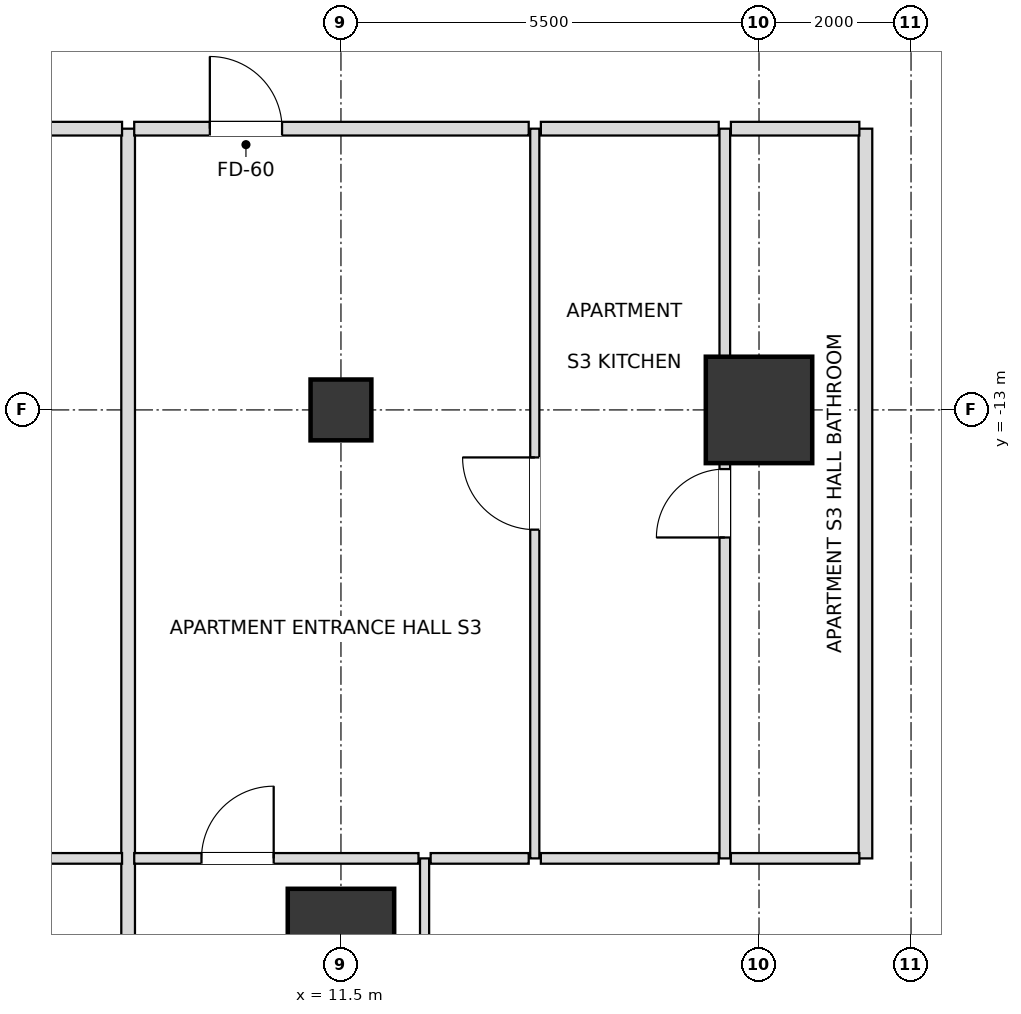
"""IFC4 building model, lengths in metres.
Left out: names, types, materials, properties, quantities, classifications, styles, units other than length and angle.
Written with IfcOpenShell. Run it as: python <this file> out.ifc"""

import sys

from ifc_helpers import new_model, si_unit, direction, frame, frame_2d, origin, origin_2d, place, context, subcontext, project, spatial, rectangle, extrude, element, fill, save


model = new_model("IFC4")
c1 = context("Model", 3, precision=1e-05, world=origin(), true_north=direction((0.0, 1.0)))
c2 = subcontext(c1, "Body", "Model", "MODEL_VIEW")
j1 = project(units=[si_unit("LENGTHUNIT", "METRE"), si_unit("PLANEANGLEUNIT", "RADIAN")], contexts=[c1])
p1 = place(None, origin())
s1 = spatial("IfcSite", under=j1, at=p1, CompositionType="ELEMENT")
p2 = place(p1, origin())
s2 = spatial("IfcBuilding", under=s1, at=p2, CompositionType="ELEMENT")
p3 = place(p2, frame((0.0, 0.0, 46.8)))
s3 = spatial("IfcBuildingStorey", under=s2, at=p3, CompositionType="ELEMENT", Elevation=46.8)
for number, where, z_axis, x_axis in (
    (1, (11.5, -20.0, 0.0), (0.0, 0.0, 1.0), (1.0, 0.0, 0.0)),
    (2, (17.0, -13.0, 0.0), (0.0, 0.0, 1.0), (1.0, 0.0, 0.0)),
):
    element("IfcColumn", number, at=place(p3, frame(where, z_axis=z_axis, x_axis=x_axis)), inside=s3, PredefinedType="USERDEFINED", context=c2, shape_type="SweptSolid", body=[
        extrude(rectangle(XDim=1.4, YDim=1.4, at=origin_2d()), origin(), (0.0, 0.0, 1.0), 3.6),
    ])
p4 = place(p3, frame((11.5, -13.0, 0.0), z_axis=(0.0, 0.0, 1.0), x_axis=(1.0, 0.0, 0.0)))
e3 = element("IfcColumn", 3, at=p4, inside=s3, PredefinedType="COLUMN", context=c2, shape_type="SweptSolid", body=[
    extrude(rectangle(XDim=0.8, YDim=0.8, at=origin_2d()), origin(), (0.0, 0.0, 1.0), 3.6),
])
p5 = place(p3, frame((8.7, -24.9, 0.0), z_axis=(0.0, 0.0, 1.0), x_axis=(0.0, 1.0, 0.0)))
e4 = element("IfcWall", 4, at=p5, inside=s3, PredefinedType="PARTITIONING", context=c2, shape_type="SweptSolid", body=[
    extrude(rectangle(XDim=15.6, YDim=0.18, at=frame_2d((7.8, 0.0))), origin(), (0.0, 0.0, 1.0), 2.816),
])
p6 = place(p3, frame((12.6, -24.9, 0.0), z_axis=(0.0, 0.0, 1.0), x_axis=(0.0, 1.0, 0.0)))
e5 = element("IfcWall", 5, at=p6, inside=s3, PredefinedType="PARTITIONING", context=c2, shape_type="SweptSolid", body=[
    extrude(rectangle(XDim=6.0, YDim=0.12, at=frame_2d((3.0, 0.0))), origin(), (0.0, 0.0, 1.0), 2.736),
])
p7 = place(p6, frame((2.55, 0.0, 0.0)))
e6 = element("IfcOpeningElement", 6, at=p7, cuts=e5, PredefinedType="OPENING", context=c2, shape_type="SweptSolid", body=[
    extrude(rectangle(XDim=0.9, YDim=2.1, at=frame_2d((0.45, 1.05))), frame((0.0, 0.07, 0.0), z_axis=(0.0, -1.0, 0.0), x_axis=(1.0, 0.0, 0.0)), (0.0, 0.0, 1.0), 0.14),
])
p8 = place(p3, frame((14.05, -18.9, 0.0), z_axis=(0.0, 0.0, 1.0), x_axis=(0.0, 1.0, 0.0)))
e7 = element("IfcWall", 7, at=p8, inside=s3, PredefinedType="PARTITIONING", context=c2, shape_type="SweptSolid", body=[
    extrude(rectangle(XDim=9.6, YDim=0.12, at=frame_2d((4.8, 0.0))), origin(), (0.0, 0.0, 1.0), 2.736),
])
p9 = place(p8, frame((4.325, 0.0, 0.0)))
e8 = element("IfcOpeningElement", 8, at=p9, cuts=e7, PredefinedType="OPENING", context=c2, shape_type="SweptSolid", body=[
    extrude(rectangle(XDim=0.95, YDim=2.1, at=frame_2d((0.475, 1.05))), frame((0.0, 0.07, 0.0), z_axis=(0.0, -1.0, 0.0), x_axis=(1.0, 0.0, 0.0)), (0.0, 0.0, 1.0), 0.14),
])
p10 = place(p3, frame((16.55, -18.9, 0.0), z_axis=(0.0, 0.0, 1.0), x_axis=(0.0, 1.0, 0.0)))
e9 = element("IfcWall", 9, at=p10, inside=s3, PredefinedType="PARTITIONING", context=c2, shape_type="SweptSolid", body=[
    extrude(rectangle(XDim=9.6, YDim=0.14, at=frame_2d((4.8, 0.0))), origin(), (0.0, 0.0, 1.0), 2.736),
])
p11 = place(p10, frame((4.222, 0.0, 0.0)))
e10 = element("IfcOpeningElement", 10, at=p11, cuts=e9, PredefinedType="OPENING", context=c2, shape_type="SweptSolid", body=[
    extrude(rectangle(XDim=0.9, YDim=2.1, at=frame_2d((0.45, 1.05))), frame((0.0, 0.08, 0.0), z_axis=(0.0, -1.0, 0.0), x_axis=(1.0, 0.0, 0.0)), (0.0, 0.0, 1.0), 0.16),
])
p12 = place(p3, frame((18.4, -18.9, 0.0), z_axis=(0.0, 0.0, 1.0), x_axis=(0.0, 1.0, 0.0)))
e11 = element("IfcWall", 11, at=p12, inside=s3, PredefinedType="PARTITIONING", context=c2, shape_type="SweptSolid", body=[
    extrude(rectangle(XDim=9.6, YDim=0.18, at=frame_2d((4.8, 0.0))), origin(), (0.0, 0.0, 1.0), 2.736),
])
p13 = place(p3, frame((5.83, -18.9, 0.0), z_axis=(0.0, 0.0, 1.0), x_axis=(1.0, 0.0, 0.0)))
e12 = element("IfcWall", 12, at=p13, inside=s3, PredefinedType="PARTITIONING", context=c2, shape_type="SweptSolid", body=[
    extrude(rectangle(XDim=2.79, YDim=0.14, at=frame_2d((1.395, 0.0))), origin(), (0.0, 0.0, 1.0), 2.816),
])
p14 = place(p3, frame((8.78, -18.9, 0.0), z_axis=(0.0, 0.0, 1.0), x_axis=(1.0, 0.0, 0.0)))
e13 = element("IfcWall", 13, at=p14, inside=s3, PredefinedType="PARTITIONING", context=c2, shape_type="SweptSolid", body=[
    extrude(rectangle(XDim=3.74, YDim=0.14, at=frame_2d((1.87, 0.0))), origin(), (0.0, 0.0, 1.0), 2.736),
])
p15 = place(p14, frame((0.885, 0.0, 0.0)))
e14 = element("IfcOpeningElement", 14, at=p15, cuts=e13, PredefinedType="OPENING", context=c2, shape_type="SweptSolid", body=[
    extrude(rectangle(XDim=0.95, YDim=2.1, at=frame_2d((0.475, 1.05))), frame((0.0, 0.08, 0.0), z_axis=(0.0, -1.0, 0.0), x_axis=(1.0, 0.0, 0.0)), (0.0, 0.0, 1.0), 0.16),
])
p16 = place(p3, frame((12.68, -18.9, 0.0), z_axis=(0.0, 0.0, 1.0), x_axis=(1.0, 0.0, 0.0)))
e15 = element("IfcWall", 15, at=p16, inside=s3, PredefinedType="PARTITIONING", context=c2, shape_type="SweptSolid", body=[
    extrude(rectangle(XDim=1.29, YDim=0.14, at=frame_2d((0.645, 0.0))), origin(), (0.0, 0.0, 1.0), 2.736),
])
p17 = place(p3, frame((14.13, -18.9, 0.0), z_axis=(0.0, 0.0, 1.0), x_axis=(1.0, 0.0, 0.0)))
e16 = element("IfcWall", 16, at=p17, inside=s3, PredefinedType="PARTITIONING", context=c2, shape_type="SweptSolid", body=[
    extrude(rectangle(XDim=2.34, YDim=0.14, at=frame_2d((1.17, 0.0))), origin(), (0.0, 0.0, 1.0), 2.736),
])
p18 = place(p3, frame((16.63, -18.9, 0.0), z_axis=(0.0, 0.0, 1.0), x_axis=(1.0, 0.0, 0.0)))
e17 = element("IfcWall", 17, at=p18, inside=s3, PredefinedType="PARTITIONING", context=c2, shape_type="SweptSolid", body=[
    extrude(rectangle(XDim=1.69, YDim=0.14, at=frame_2d((0.845, 0.0))), origin(), (0.0, 0.0, 1.0), 2.736),
])
p19 = place(p3, frame((5.83, -9.3, 0.0), z_axis=(0.0, 0.0, 1.0), x_axis=(1.0, 0.0, 0.0)))
e18 = element("IfcWall", 18, at=p19, inside=s3, PredefinedType="PARTITIONING", context=c2, shape_type="SweptSolid", body=[
    extrude(rectangle(XDim=2.79, YDim=0.18, at=frame_2d((1.395, 0.0))), origin(), (0.0, 0.0, 1.0), 2.816),
])
p20 = place(p3, frame((8.78, -9.3, 0.0), z_axis=(0.0, 0.0, 1.0), x_axis=(1.0, 0.0, 0.0)))
e19 = element("IfcWall", 19, at=p20, inside=s3, PredefinedType="PARTITIONING", context=c2, shape_type="SweptSolid", body=[
    extrude(rectangle(XDim=5.19, YDim=0.18, at=frame_2d((2.595, 0.0))), origin(), (0.0, 0.0, 1.0), 3.38),
])
p21 = place(p20, frame((0.995, 0.0, 0.0)))
e20 = element("IfcOpeningElement", 20, at=p21, cuts=e19, PredefinedType="OPENING", context=c2, shape_type="SweptSolid", body=[
    extrude(rectangle(XDim=0.95, YDim=2.15, at=frame_2d((0.475, 1.075))), frame((0.0, 0.1, 0.0), z_axis=(0.0, -1.0, 0.0), x_axis=(1.0, 0.0, 0.0)), (0.0, 0.0, 1.0), 0.2),
])
p22 = place(p3, frame((14.13, -9.3, 0.0), z_axis=(0.0, 0.0, 1.0), x_axis=(1.0, 0.0, 0.0)))
e21 = element("IfcWall", 21, at=p22, inside=s3, PredefinedType="PARTITIONING", context=c2, shape_type="SweptSolid", body=[
    extrude(rectangle(XDim=2.34, YDim=0.18, at=frame_2d((1.17, 0.0))), origin(), (0.0, 0.0, 1.0), 3.38),
])
p23 = place(p3, frame((16.63, -9.3, 0.0), z_axis=(0.0, 0.0, 1.0), x_axis=(1.0, 0.0, 0.0)))
e22 = element("IfcWall", 22, at=p23, inside=s3, PredefinedType="PARTITIONING", context=c2, shape_type="SweptSolid", body=[
    extrude(rectangle(XDim=1.69, YDim=0.18, at=frame_2d((0.845, 0.0))), origin(), (0.0, 0.0, 1.0), 2.816),
])
p24 = place(p21, origin())
e23 = element("IfcDoor", 23, at=p24, inside=s3, OperationType="SINGLE_SWING_LEFT", PredefinedType="DOOR", context=c2, shape_type="SweptSolid", body=[
    extrude(rectangle(XDim=0.95, YDim=2.15, at=frame_2d((0.475, 1.075))), frame((0.0, 0.025, 0.0), z_axis=(0.0, -1.0, 0.0), x_axis=(1.0, 0.0, 0.0)), (0.0, 0.0, 1.0), 0.05),
])
fill(e20, e23)
p25 = place(p9, origin())
e24 = element("IfcDoor", 24, at=p25, inside=s3, OperationType="SINGLE_SWING_RIGHT", PredefinedType="DOOR", context=c2, shape_type="SweptSolid", body=[
    extrude(rectangle(XDim=0.95, YDim=2.1, at=frame_2d((0.475, 1.05))), frame((0.0, 0.025, 0.0), z_axis=(0.0, -1.0, 0.0), x_axis=(1.0, 0.0, 0.0)), (0.0, 0.0, 1.0), 0.05),
])
fill(e8, e24)
p26 = place(p11, origin())
e25 = element("IfcDoor", 25, at=p26, inside=s3, OperationType="SINGLE_SWING_LEFT", PredefinedType="DOOR", context=c2, shape_type="SweptSolid", body=[
    extrude(rectangle(XDim=0.9, YDim=2.1, at=frame_2d((0.45, 1.05))), frame((0.0, 0.025, 0.0), z_axis=(0.0, -1.0, 0.0), x_axis=(1.0, 0.0, 0.0)), (0.0, 0.0, 1.0), 0.05),
])
fill(e10, e25)
p27 = place(p15, origin())
e26 = element("IfcDoor", 26, at=p27, inside=s3, OperationType="SINGLE_SWING_RIGHT", PredefinedType="DOOR", context=c2, shape_type="SweptSolid", body=[
    extrude(rectangle(XDim=0.95, YDim=2.1, at=frame_2d((0.475, 1.05))), frame((0.0, 0.025, 0.0), z_axis=(0.0, -1.0, 0.0), x_axis=(1.0, 0.0, 0.0)), (0.0, 0.0, 1.0), 0.05),
])
fill(e14, e26)
save(model, sys.argv[1])
